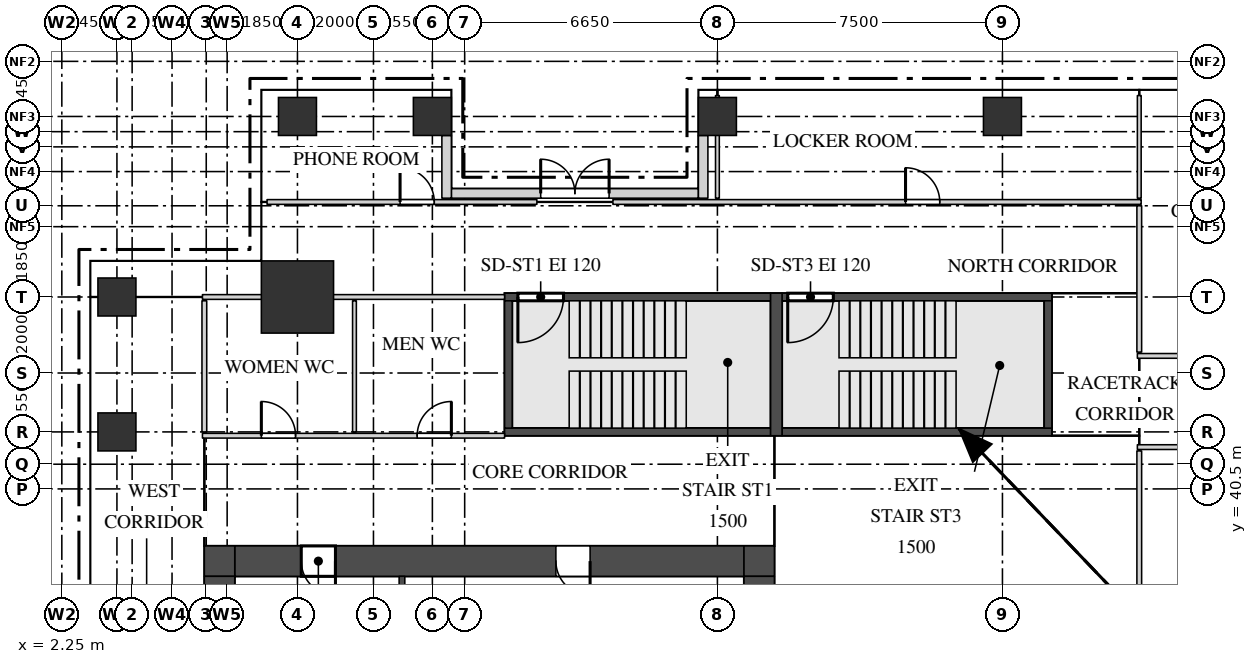
"""IFC4 building model, lengths in metres.
Left out: names, types, materials, properties, quantities, classifications, styles, units other than length and angle.
Written with IfcOpenShell. Run it as: python <this file> out.ifc"""

import sys

from ifc_helpers import new_model, si_unit, direction, frame, frame_2d, origin, origin_2d, place, context, subcontext, project, spatial, rectangle, extrude, source, transform, mapped, element, fill, save


model = new_model("IFC4")
c1 = context("Model", 3, precision=1e-05, world=origin(), true_north=direction((0.0, 1.0)))
c2 = subcontext(c1, "Body", "Model", "MODEL_VIEW")
j1 = project(units=[si_unit("LENGTHUNIT", "METRE"), si_unit("PLANEANGLEUNIT", "RADIAN")], contexts=[c1])
p1 = place(None, origin())
s1 = spatial("IfcSite", under=j1, at=p1, CompositionType="ELEMENT")
p2 = place(p1, origin())
s2 = spatial("IfcBuilding", under=s1, at=p2, CompositionType="ELEMENT")
p3 = place(p2, frame((0.0, 0.0, 188.7)))
s3 = spatial("IfcBuildingStorey", under=s2, at=p3, CompositionType="ELEMENT", Elevation=188.7)
m1 = source(origin(), c2, "Body", "SweptSolid", [
    extrude(rectangle(XDim=13.4, YDim=0.8, at=frame_2d((6.7, 0.0))), origin(), (0.0, 0.0, 1.0), 3.75),
])
p4 = place(p3, frame((6.8, 38.6, 0.0), z_axis=(0.0, 0.0, 1.0), x_axis=(1.0, 0.0, 0.0)))
e1 = element("IfcWall", 1, at=p4, inside=s3, PredefinedType="SHEAR", context=c2, shape_type="MappedRepresentation", body=[
    mapped(m1, transform((0.0, 0.0, 0.0))),
])
m2 = source(origin(), c2, "Body", "SweptSolid", [
    extrude(rectangle(XDim=0.9, YDim=2.1, at=frame_2d((0.45, 1.05))), frame((0.0, 0.41, 0.0), z_axis=(0.0, -1.0, 0.0), x_axis=(1.0, 0.0, 0.0)), (0.0, 0.0, 1.0), 0.82),
])
p5 = place(p4, frame((1.75, 0.0, 0.0)))
e2 = element("IfcOpeningElement", 2, at=p5, cuts=e1, PredefinedType="OPENING", context=c2, shape_type="MappedRepresentation", body=[
    mapped(m2, transform((0.0, 0.0, 0.0))),
])
p6 = place(p4, frame((8.45, 0.0, 0.0)))
e3 = element("IfcOpeningElement", 3, at=p6, cuts=e1, PredefinedType="OPENING", context=c2, shape_type="MappedRepresentation", body=[
    mapped(m2, transform((0.0, 0.0, 0.0))),
])
m3 = source(origin(), c2, "Body", "SweptSolid", [
    extrude(rectangle(XDim=0.8, YDim=0.8, at=frame_2d((0.4, 0.0))), origin(), (0.0, 0.0, 1.0), 3.75),
])
for number, where, z_axis, x_axis in (
    (4, (20.2, 38.6, 0.0), (0.0, 0.0, 1.0), (1.0, 0.0, 0.0)),
    (5, (6.0, 38.6, 0.0), (0.0, 0.0, 1.0), (1.0, 0.0, 0.0)),
):
    element("IfcWall", number, at=place(p3, frame(where, z_axis=z_axis, x_axis=x_axis)), inside=s3, PredefinedType="SHEAR", context=c2, shape_type="MappedRepresentation", body=[
        mapped(m3, transform((0.0, 0.0, 0.0))),
    ])
m4 = source(origin(), c2, "Body", "SweptSolid", [
    extrude(rectangle(XDim=22.4, YDim=0.8, at=frame_2d((11.2, 0.0))), origin(), (0.0, 0.0, 1.0), 3.75),
])
p7 = place(p3, frame((20.6, 15.8, 0.0), z_axis=(0.0, 0.0, 1.0), x_axis=(0.0, 1.0, 0.0)))
e6 = element("IfcWall", 6, at=p7, inside=s3, PredefinedType="SHEAR", context=c2, shape_type="MappedRepresentation", body=[
    mapped(m4, transform((0.0, 0.0, 0.0))),
])
m5 = source(origin(), c2, "Body", "SweptSolid", [
    extrude(rectangle(XDim=1.8, YDim=2.1, at=frame_2d((0.9, 1.05))), frame((0.0, 0.41, 0.0), z_axis=(0.0, -1.0, 0.0), x_axis=(1.0, 0.0, 0.0)), (0.0, 0.0, 1.0), 0.82),
])
p8 = place(p7, frame((10.7, 0.0, 0.0)))
e7 = element("IfcOpeningElement", 7, at=p8, cuts=e6, PredefinedType="OPENING", context=c2, shape_type="MappedRepresentation", body=[
    mapped(m5, transform((0.0, 0.0, 0.0))),
])
p9 = place(p7, frame((0.35, 0.0, 0.0)))
e8 = element("IfcOpeningElement", 8, at=p9, cuts=e6, PredefinedType="OPENING", context=c2, shape_type="MappedRepresentation", body=[
    mapped(m2, transform((0.0, 0.0, 0.0))),
])
p10 = place(p7, frame((2.15, 0.0, 0.0)))
e9 = element("IfcOpeningElement", 9, at=p10, cuts=e6, PredefinedType="OPENING", context=c2, shape_type="MappedRepresentation", body=[
    mapped(m2, transform((0.0, 0.0, 0.0))),
])
m6 = source(origin(), c2, "Body", "SweptSolid", [
    extrude(rectangle(XDim=1.0, YDim=2.1, at=frame_2d((0.5, 1.05))), frame((0.0, 0.41, 0.0), z_axis=(0.0, -1.0, 0.0), x_axis=(1.0, 0.0, 0.0)), (0.0, 0.0, 1.0), 0.82),
])
p11 = place(p7, frame((4.85, 0.0, 0.0)))
e10 = element("IfcOpeningElement", 10, at=p11, cuts=e6, PredefinedType="OPENING", context=c2, shape_type="MappedRepresentation", body=[
    mapped(m6, transform((0.0, 0.0, 0.0))),
])
p12 = place(p3, frame((6.4, 15.8, 0.0), z_axis=(0.0, 0.0, 1.0), x_axis=(0.0, 1.0, 0.0)))
e11 = element("IfcWall", 11, at=p12, inside=s3, PredefinedType="SHEAR", context=c2, shape_type="MappedRepresentation", body=[
    mapped(m4, transform((0.0, 0.0, 0.0))),
])
m7 = source(origin(), c2, "Body", "SweptSolid", [
    extrude(rectangle(XDim=7.0, YDim=0.2, at=frame_2d((3.5, 0.0))), origin(), (0.0, 0.0, 1.0), 3.75),
])
p13 = place(p3, frame((13.9, 45.55, 0.0), z_axis=(0.0, 0.0, 1.0), x_axis=(1.0, 0.0, 0.0)))
e12 = element("IfcWall", 12, at=p13, inside=s3, PredefinedType="SHEAR", context=c2, shape_type="MappedRepresentation", body=[
    mapped(m7, transform((0.0, 0.0, 0.0))),
])
m8 = source(origin(), c2, "Body", "SweptSolid", [
    extrude(rectangle(XDim=1.2, YDim=2.1, at=frame_2d((0.6, 1.05))), frame((0.0, 0.11, 0.0), z_axis=(0.0, -1.0, 0.0), x_axis=(1.0, 0.0, 0.0)), (0.0, 0.0, 1.0), 0.22),
])
p14 = place(p13, frame((0.35, 0.0, 0.0)))
e13 = element("IfcOpeningElement", 13, at=p14, cuts=e12, PredefinedType="OPENING", context=c2, shape_type="MappedRepresentation", body=[
    mapped(m8, transform((0.0, 0.0, 0.0))),
])
p15 = place(p3, frame((13.9, 42.0, 0.0), z_axis=(0.0, 0.0, 1.0), x_axis=(1.0, 0.0, 0.0)))
e14 = element("IfcWall", 14, at=p15, inside=s3, PredefinedType="SHEAR", context=c2, shape_type="MappedRepresentation", body=[
    mapped(m7, transform((0.0, 0.0, 0.0))),
])
m9 = source(origin(), c2, "Body", "SweptSolid", [
    extrude(rectangle(XDim=7.1, YDim=0.2, at=frame_2d((3.55, 0.0))), origin(), (0.0, 0.0, 1.0), 3.75),
])
p16 = place(p3, frame((21.2, 45.55, 0.0), z_axis=(0.0, 0.0, 1.0), x_axis=(1.0, 0.0, 0.0)))
e15 = element("IfcWall", 15, at=p16, inside=s3, PredefinedType="SHEAR", context=c2, shape_type="MappedRepresentation", body=[
    mapped(m9, transform((0.0, 0.0, 0.0))),
])
p17 = place(p16, frame((0.15, 0.0, 0.0)))
e16 = element("IfcOpeningElement", 16, at=p17, cuts=e15, PredefinedType="OPENING", context=c2, shape_type="MappedRepresentation", body=[
    mapped(m8, transform((0.0, 0.0, 0.0))),
])
p18 = place(p3, frame((21.2, 42.0, 0.0), z_axis=(0.0, 0.0, 1.0), x_axis=(1.0, 0.0, 0.0)))
e17 = element("IfcWall", 17, at=p18, inside=s3, PredefinedType="SHEAR", context=c2, shape_type="MappedRepresentation", body=[
    mapped(m9, transform((0.0, 0.0, 0.0))),
])
m10 = source(origin(), c2, "Body", "SweptSolid", [
    extrude(rectangle(XDim=3.75, YDim=0.3, at=frame_2d((1.875, 0.0))), origin(), (0.0, 0.0, 1.0), 3.75),
])
p19 = place(p3, frame((21.05, 41.9, 0.0), z_axis=(0.0, 0.0, 1.0), x_axis=(0.0, 1.0, 0.0)))
e18 = element("IfcWall", 18, at=p19, inside=s3, PredefinedType="SHEAR", context=c2, shape_type="MappedRepresentation", body=[
    mapped(m10, transform((0.0, 0.0, 0.0))),
])
m11 = source(origin(), c2, "Body", "SweptSolid", [
    extrude(rectangle(XDim=3.35, YDim=0.2, at=frame_2d((1.675, 0.0))), origin(), (0.0, 0.0, 1.0), 3.75),
])
for number, where, z_axis, x_axis in (
    (19, (14.0, 42.1, 0.0), (0.0, 0.0, 1.0), (0.0, 1.0, 0.0)),
    (20, (28.2, 42.1, 0.0), (0.0, 0.0, 1.0), (0.0, 1.0, 0.0)),
):
    element("IfcWall", number, at=place(p3, frame(where, z_axis=z_axis, x_axis=x_axis)), inside=s3, PredefinedType="SHEAR", context=c2, shape_type="MappedRepresentation", body=[
        mapped(m11, transform((0.0, 0.0, 0.0))),
    ])
m12 = source(origin(), c2, "Body", "SweptSolid", [
    extrude(rectangle(XDim=1.9, YDim=1.9, at=origin_2d()), origin(), (0.0, 0.0, 1.0), 4.0),
])
p20 = place(p3, frame((8.45, 45.55, 0.0), z_axis=(0.0, 0.0, 1.0), x_axis=(1.0, 0.0, 0.0)))
e21 = element("IfcColumn", 21, at=p20, inside=s3, PredefinedType="COLUMN", context=c2, shape_type="MappedRepresentation", body=[
    mapped(m12, transform((0.0, 0.0, 0.0))),
])
m13 = source(origin(), c2, "Body", "SweptSolid", [
    extrude(rectangle(XDim=1.0, YDim=1.0, at=origin_2d()), origin(), (0.0, 0.0, 1.0), 3.75),
])
for number, where, z_axis, x_axis in (
    (22, (8.45, 50.3, 0.0), (0.0, 0.0, 1.0), (1.0, 0.0, 0.0)),
    (23, (12.0, 50.3, 0.0), (0.0, 0.0, 1.0), (1.0, 0.0, 0.0)),
    (24, (19.5, 50.3, 0.0), (0.0, 0.0, 1.0), (1.0, 0.0, 0.0)),
    (25, (27.0, 50.3, 0.0), (0.0, 0.0, 1.0), (1.0, 0.0, 0.0)),
    (26, (3.7, 42.0, 0.0), (0.0, 0.0, 1.0), (1.0, 0.0, 0.0)),
    (27, (3.7, 45.55, 0.0), (0.0, 0.0, 1.0), (1.0, 0.0, 0.0)),
):
    element("IfcColumn", number, at=place(p3, frame(where, z_axis=z_axis, x_axis=x_axis)), inside=s3, PredefinedType="COLUMN", context=c2, shape_type="MappedRepresentation", body=[
        mapped(m13, transform((0.0, 0.0, 0.0))),
    ])
m14 = source(origin(), c2, "Body", "SweptSolid", [
    extrude(rectangle(XDim=6.5, YDim=0.25, at=frame_2d((3.25, 0.0))), origin(), (0.0, 0.0, 1.0), 3.75),
])
p21 = place(p3, frame((12.5, 48.275, 0.0), z_axis=(0.0, 0.0, 1.0), x_axis=(1.0, 0.0, 0.0)))
e28 = element("IfcWall", 28, at=p21, inside=s3, PredefinedType="SOLIDWALL", context=c2, shape_type="MappedRepresentation", body=[
    mapped(m14, transform((0.0, 0.0, 0.0))),
])
m15 = source(origin(), c2, "Body", "SweptSolid", [
    extrude(rectangle(XDim=1.75, YDim=2.4, at=frame_2d((0.875, 1.2))), frame((0.0, 0.135, 0.0), z_axis=(0.0, -1.0, 0.0), x_axis=(1.0, 0.0, 0.0)), (0.0, 0.0, 1.0), 0.27),
])
p22 = place(p21, frame((0.3, 0.0, 0.0)))
e29 = element("IfcOpeningElement", 29, at=p22, cuts=e28, PredefinedType="OPENING", context=c2, shape_type="MappedRepresentation", body=[
    mapped(m15, transform((0.0, 0.0, 0.0))),
])
p23 = place(p21, frame((4.45, 0.0, 0.0)))
e30 = element("IfcOpeningElement", 30, at=p23, cuts=e28, PredefinedType="OPENING", context=c2, shape_type="MappedRepresentation", body=[
    mapped(m15, transform((0.0, 0.0, 0.0))),
])
m16 = source(origin(), c2, "Body", "SweptSolid", [
    extrude(rectangle(XDim=1.8, YDim=2.4, at=frame_2d((0.9, 1.2))), frame((0.0, 0.135, 0.0), z_axis=(0.0, -1.0, 0.0), x_axis=(1.0, 0.0, 0.0)), (0.0, 0.0, 1.0), 0.27),
])
p24 = place(p21, frame((2.35, 0.0, 0.0)))
e31 = element("IfcOpeningElement", 31, at=p24, cuts=e28, PredefinedType="OPENING", context=c2, shape_type="MappedRepresentation", body=[
    mapped(m16, transform((0.0, 0.0, 0.0))),
])
m17 = source(origin(), c2, "Body", "SweptSolid", [
    extrude(rectangle(XDim=1.65, YDim=0.25, at=frame_2d((0.825, 0.0))), origin(), (0.0, 0.0, 1.0), 3.45),
])
for number, where, z_axis, x_axis in (
    (32, (12.375, 49.8, 0.0), (0.0, 0.0, 1.0), (0.0, -1.0, 0.0)),
    (33, (19.125, 49.8, 0.0), (0.0, 0.0, 1.0), (0.0, -1.0, 0.0)),
):
    element("IfcWall", number, at=place(p3, frame(where, z_axis=z_axis, x_axis=x_axis)), inside=s3, PredefinedType="SOLIDWALL", context=c2, shape_type="MappedRepresentation", body=[
        mapped(m17, transform((0.0, 0.0, 0.0))),
    ])
m18 = source(origin(), c2, "Body", "SweptSolid", [
    extrude(rectangle(XDim=6.0, YDim=0.15, at=frame_2d((3.0, 0.0))), origin(), (0.0, 0.0, 1.0), 3.8),
])
p25 = place(p3, frame((11.2, 32.2, 0.0), z_axis=(0.0, 0.0, 1.0), x_axis=(0.0, 1.0, 0.0)))
e34 = element("IfcWall", 34, at=p25, inside=s3, PredefinedType="PARTITIONING", context=c2, shape_type="MappedRepresentation", body=[
    mapped(m18, transform((0.0, 0.0, 0.0))),
])
m19 = source(origin(), c2, "Body", "SweptSolid", [
    extrude(rectangle(XDim=5.4, YDim=0.125, at=frame_2d((2.7, 0.0))), origin(), (0.0, 0.0, 1.0), 3.8),
])
p26 = place(p3, frame((30.6, 36.1, 0.0), z_axis=(0.0, 0.0, 1.0), x_axis=(0.0, 1.0, 0.0)))
e35 = element("IfcWall", 35, at=p26, inside=s3, PredefinedType="PARTITIONING", context=c2, shape_type="MappedRepresentation", body=[
    mapped(m19, transform((0.0, 0.0, 0.0))),
])
m20 = source(origin(), c2, "Body", "SweptSolid", [
    extrude(rectangle(XDim=11.1, YDim=0.125, at=frame_2d((5.55, 0.0))), origin(), (0.0, 0.0, 1.0), 3.8),
])
p27 = place(p3, frame((30.55, 41.6, 0.0), z_axis=(0.0, 0.0, 1.0), x_axis=(1.0, 0.0, 0.0)))
e36 = element("IfcWall", 36, at=p27, inside=s3, PredefinedType="PARTITIONING", context=c2, shape_type="MappedRepresentation", body=[
    mapped(m20, transform((0.0, 0.0, 0.0))),
])
m21 = source(origin(), c2, "Body", "SweptSolid", [
    extrude(rectangle(XDim=0.9, YDim=2.1, at=frame_2d((0.45, 1.05))), frame((0.0, 0.073, 0.0), z_axis=(0.0, -1.0, 0.0), x_axis=(1.0, 0.0, 0.0)), (0.0, 0.0, 1.0), 0.145),
])
p28 = place(p27, frame((5.25, 0.0, 0.0)))
e37 = element("IfcOpeningElement", 37, at=p28, cuts=e36, PredefinedType="OPENING", context=c2, shape_type="MappedRepresentation", body=[
    mapped(m21, transform((0.0, 0.0, 0.0))),
])
m22 = source(origin(), c2, "Body", "SweptSolid", [
    extrude(rectangle(XDim=7.95, YDim=0.125, at=frame_2d((3.975, 0.0))), origin(), (0.0, 0.0, 1.0), 3.8),
])
p29 = place(p3, frame((5.95, 41.9, 0.0), z_axis=(0.0, 0.0, 1.0), x_axis=(1.0, 0.0, 0.0)))
e38 = element("IfcWall", 38, at=p29, inside=s3, PredefinedType="PARTITIONING", context=c2, shape_type="MappedRepresentation", body=[
    mapped(m22, transform((0.0, 0.0, 0.0))),
])
p30 = place(p29, frame((1.55, 0.0, 0.0)))
e39 = element("IfcOpeningElement", 39, at=p30, cuts=e38, PredefinedType="OPENING", context=c2, shape_type="MappedRepresentation", body=[
    mapped(m21, transform((0.0, 0.0, 0.0))),
])
p31 = place(p29, frame((5.65, 0.0, 0.0)))
e40 = element("IfcOpeningElement", 40, at=p31, cuts=e38, PredefinedType="OPENING", context=c2, shape_type="MappedRepresentation", body=[
    mapped(m21, transform((0.0, 0.0, 0.0))),
])
m23 = source(origin(), c2, "Body", "SweptSolid", [
    extrude(rectangle(XDim=3.45, YDim=0.125, at=frame_2d((1.725, 0.0))), origin(), (0.0, 0.0, 1.0), 3.8),
])
p32 = place(p3, frame((6.0, 42.0, 0.0), z_axis=(0.0, 0.0, 1.0), x_axis=(0.0, 1.0, 0.0)))
e41 = element("IfcWall", 41, at=p32, inside=s3, PredefinedType="PARTITIONING", context=c2, shape_type="MappedRepresentation", body=[
    mapped(m23, transform((0.0, 0.0, 0.0))),
])
m24 = source(origin(), c2, "Body", "SweptSolid", [
    extrude(rectangle(XDim=3.45, YDim=0.1, at=frame_2d((1.725, 0.0))), origin(), (0.0, 0.0, 1.0), 3.8),
])
p33 = place(p3, frame((9.95, 42.0, 0.0), z_axis=(0.0, 0.0, 1.0), x_axis=(0.0, 1.0, 0.0)))
e42 = element("IfcWall", 42, at=p33, inside=s3, PredefinedType="PARTITIONING", context=c2, shape_type="MappedRepresentation", body=[
    mapped(m24, transform((0.0, 0.0, 0.0))),
])
m25 = source(origin(), c2, "Body", "SweptSolid", [
    extrude(rectangle(XDim=13.4, YDim=0.125, at=frame_2d((6.7, 0.0))), origin(), (0.0, 0.0, 1.0), 3.8),
])
p34 = place(p3, frame((30.55, 44.0, 0.0), z_axis=(0.0, 0.0, 1.0), x_axis=(1.0, 0.0, 0.0)))
e43 = element("IfcWall", 43, at=p34, inside=s3, PredefinedType="PARTITIONING", context=c2, shape_type="MappedRepresentation", body=[
    mapped(m25, transform((0.0, 0.0, 0.0))),
])
p35 = place(p34, frame((5.3, 0.0, 0.0)))
e44 = element("IfcOpeningElement", 44, at=p35, cuts=e43, PredefinedType="OPENING", context=c2, shape_type="MappedRepresentation", body=[
    mapped(m21, transform((0.0, 0.0, 0.0))),
])
p36 = place(p34, frame((11.85, 0.0, 0.0)))
e45 = element("IfcOpeningElement", 45, at=p36, cuts=e43, PredefinedType="OPENING", context=c2, shape_type="MappedRepresentation", body=[
    mapped(m21, transform((0.0, 0.0, 0.0))),
])
m26 = source(origin(), c2, "Body", "SweptSolid", [
    extrude(rectangle(XDim=3.85, YDim=0.125, at=frame_2d((1.925, 0.0))), origin(), (0.0, 0.0, 1.0), 3.8),
])
p37 = place(p3, frame((30.6, 44.1, 0.0), z_axis=(0.0, 0.0, 1.0), x_axis=(0.0, 1.0, 0.0)))
e46 = element("IfcWall", 46, at=p37, inside=s3, PredefinedType="PARTITIONING", context=c2, shape_type="MappedRepresentation", body=[
    mapped(m26, transform((0.0, 0.0, 0.0))),
])
m27 = source(origin(), c2, "Body", "SweptSolid", [
    extrude(rectangle(XDim=7.95, YDim=0.125, at=frame_2d((3.975, 0.0))), origin(), (0.0, 0.0, 1.0), 3.25),
])
p38 = place(p3, frame((5.95, 45.55, 0.0), z_axis=(0.0, 0.0, 1.0), x_axis=(1.0, 0.0, 0.0)))
e47 = element("IfcWall", 47, at=p38, inside=s3, PredefinedType="PARTITIONING", context=c2, shape_type="MappedRepresentation", body=[
    mapped(m27, transform((0.0, 0.0, 0.0))),
])
m28 = source(origin(), c2, "Body", "SweptSolid", [
    extrude(rectangle(XDim=2.7, YDim=0.1, at=frame_2d((1.35, 0.0))), origin(), (0.0, 0.0, 1.0), 3.42),
])
p39 = place(p3, frame((19.5, 48.15, 0.0), z_axis=(0.0, 0.0, 1.0), x_axis=(0.0, 1.0, 0.0)))
e48 = element("IfcWall", 48, at=p39, inside=s3, PredefinedType="PARTITIONING", context=c2, shape_type="MappedRepresentation", body=[
    mapped(m28, transform((0.0, 0.0, 0.0))),
])
m29 = source(origin(), c2, "Body", "SweptSolid", [
    extrude(rectangle(XDim=2.7, YDim=0.1, at=frame_2d((1.35, 0.0))), origin(), (0.0, 0.0, 1.0), 3.8),
])
p40 = place(p3, frame((30.6, 48.15, 0.0), z_axis=(0.0, 0.0, 1.0), x_axis=(0.0, 1.0, 0.0)))
e49 = element("IfcWall", 49, at=p40, inside=s3, PredefinedType="PARTITIONING", context=c2, shape_type="MappedRepresentation", body=[
    mapped(m29, transform((0.0, 0.0, 0.0))),
])
m30 = source(origin(), c2, "Body", "SweptSolid", [
    extrude(rectangle(XDim=7.1, YDim=0.125, at=frame_2d((3.55, 0.0))), origin(), (0.0, 0.0, 1.0), 3.8),
])
p41 = place(p3, frame((7.65, 48.05, 0.0), z_axis=(0.0, 0.0, 1.0), x_axis=(1.0, 0.0, 0.0)))
e50 = element("IfcWall", 50, at=p41, inside=s3, PredefinedType="PARTITIONING", context=c2, shape_type="MappedRepresentation", body=[
    mapped(m30, transform((0.0, 0.0, 0.0))),
])
p42 = place(p41, frame((3.5, 0.0, 0.0)))
e51 = element("IfcOpeningElement", 51, at=p42, cuts=e50, PredefinedType="OPENING", context=c2, shape_type="MappedRepresentation", body=[
    mapped(m21, transform((0.0, 0.0, 0.0))),
])
m31 = source(origin(), c2, "Body", "SweptSolid", [
    extrude(rectangle(XDim=13.9, YDim=0.125, at=frame_2d((6.95, 0.0))), origin(), (0.0, 0.0, 1.0), 3.8),
])
p43 = place(p3, frame((16.75, 48.05, 0.0), z_axis=(0.0, 0.0, 1.0), x_axis=(1.0, 0.0, 0.0)))
e52 = element("IfcWall", 52, at=p43, inside=s3, PredefinedType="PARTITIONING", context=c2, shape_type="MappedRepresentation", body=[
    mapped(m31, transform((0.0, 0.0, 0.0))),
])
p44 = place(p43, frame((7.7, 0.0, 0.0)))
e53 = element("IfcOpeningElement", 53, at=p44, cuts=e52, PredefinedType="OPENING", context=c2, shape_type="MappedRepresentation", body=[
    mapped(m21, transform((0.0, 0.0, 0.0))),
])
m32 = source(origin(), c2, "Body", "SweptSolid", [
    extrude(rectangle(XDim=1.75, YDim=2.4, at=frame_2d((0.875, 1.2))), frame((0.0, 0.03, 0.0), z_axis=(0.0, -1.0, 0.0), x_axis=(1.0, 0.0, 0.0)), (0.0, 0.0, 1.0), 0.06),
])
p45 = place(p22, origin())
e54 = element("IfcWindow", 54, at=p45, inside=s3, PartitioningType="SINGLE_PANEL", PredefinedType="WINDOW", context=c2, shape_type="MappedRepresentation", body=[
    mapped(m32, transform((0.0, 0.0, 0.0))),
])
fill(e29, e54)
p46 = place(p23, origin())
e55 = element("IfcWindow", 55, at=p46, inside=s3, PartitioningType="SINGLE_PANEL", PredefinedType="WINDOW", context=c2, shape_type="MappedRepresentation", body=[
    mapped(m32, transform((0.0, 0.0, 0.0))),
])
fill(e30, e55)
m33 = source(origin(), c2, "Body", "SweptSolid", [
    extrude(rectangle(XDim=1.8, YDim=2.4, at=frame_2d((0.9, 1.2))), frame((0.0, 0.025, 0.0), z_axis=(0.0, -1.0, 0.0), x_axis=(1.0, 0.0, 0.0)), (0.0, 0.0, 1.0), 0.05),
])
p47 = place(p24, origin())
e56 = element("IfcDoor", 56, at=p47, inside=s3, OperationType="DOUBLE_DOOR_DOUBLE_SWING", PredefinedType="DOOR", context=c2, shape_type="MappedRepresentation", body=[
    mapped(m33, transform((0.0, 0.0, 0.0))),
])
fill(e31, e56)
m34 = source(origin(), c2, "Body", "SweptSolid", [
    extrude(rectangle(XDim=0.9, YDim=2.1, at=frame_2d((0.45, 1.05))), frame((0.0, 0.35, 0.0), z_axis=(0.0, -1.0, 0.0), x_axis=(1.0, 0.0, 0.0)), (0.0, 0.0, 1.0), 0.7),
])
p48 = place(p5, origin())
e57 = element("IfcDoor", 57, at=p48, inside=s3, OperationType="SINGLE_SWING_RIGHT", PredefinedType="DOOR", context=c2, shape_type="MappedRepresentation", body=[
    mapped(m34, transform((0.0, 0.0, 0.0))),
])
fill(e2, e57)
p49 = place(p6, origin())
e58 = element("IfcDoor", 58, at=p49, inside=s3, OperationType="SINGLE_SWING_RIGHT", PredefinedType="DOOR", context=c2, shape_type="MappedRepresentation", body=[
    mapped(m34, transform((0.0, 0.0, 0.0))),
])
fill(e3, e58)
m35 = source(origin(), c2, "Body", "SweptSolid", [
    extrude(rectangle(XDim=0.9, YDim=2.1, at=frame_2d((0.45, 1.05))), frame((0.0, 0.025, 0.0), z_axis=(0.0, -1.0, 0.0), x_axis=(1.0, 0.0, 0.0)), (0.0, 0.0, 1.0), 0.05),
])
p50 = place(p30, origin())
e59 = element("IfcDoor", 59, at=p50, inside=s3, OperationType="SINGLE_SWING_RIGHT", PredefinedType="DOOR", context=c2, shape_type="MappedRepresentation", body=[
    mapped(m35, transform((0.0, 0.0, 0.0))),
])
fill(e39, e59)
p51 = place(p31, origin())
e60 = element("IfcDoor", 60, at=p51, inside=s3, OperationType="SINGLE_SWING_LEFT", PredefinedType="DOOR", context=c2, shape_type="MappedRepresentation", body=[
    mapped(m35, transform((0.0, 0.0, 0.0))),
])
fill(e40, e60)
p52 = place(p42, origin())
e61 = element("IfcDoor", 61, at=p52, inside=s3, OperationType="SINGLE_SWING_RIGHT", PredefinedType="DOOR", context=c2, shape_type="MappedRepresentation", body=[
    mapped(m35, transform((0.0, 0.0, 0.0))),
])
fill(e51, e61)
p53 = place(p44, origin())
e62 = element("IfcDoor", 62, at=p53, inside=s3, OperationType="SINGLE_SWING_RIGHT", PredefinedType="DOOR", context=c2, shape_type="MappedRepresentation", body=[
    mapped(m35, transform((0.0, 0.0, 0.0))),
])
fill(e53, e62)
m36 = source(origin(), c2, "Body", "SweptSolid", [
    extrude(rectangle(XDim=1.2, YDim=2.1, at=frame_2d((0.6, 1.05))), frame((0.0, 0.025, 0.0), z_axis=(0.0, -1.0, 0.0), x_axis=(1.0, 0.0, 0.0)), (0.0, 0.0, 1.0), 0.05),
])
p54 = place(p14, origin())
e63 = element("IfcDoor", 63, at=p54, inside=s3, OperationType="SINGLE_SWING_LEFT", PredefinedType="DOOR", context=c2, shape_type="MappedRepresentation", body=[
    mapped(m36, transform((0.0, 0.0, 0.0))),
])
fill(e13, e63)
p55 = place(p17, origin())
e64 = element("IfcDoor", 64, at=p55, inside=s3, OperationType="SINGLE_SWING_LEFT", PredefinedType="DOOR", context=c2, shape_type="MappedRepresentation", body=[
    mapped(m36, transform((0.0, 0.0, 0.0))),
])
fill(e16, e64)
save(model, sys.argv[1])
